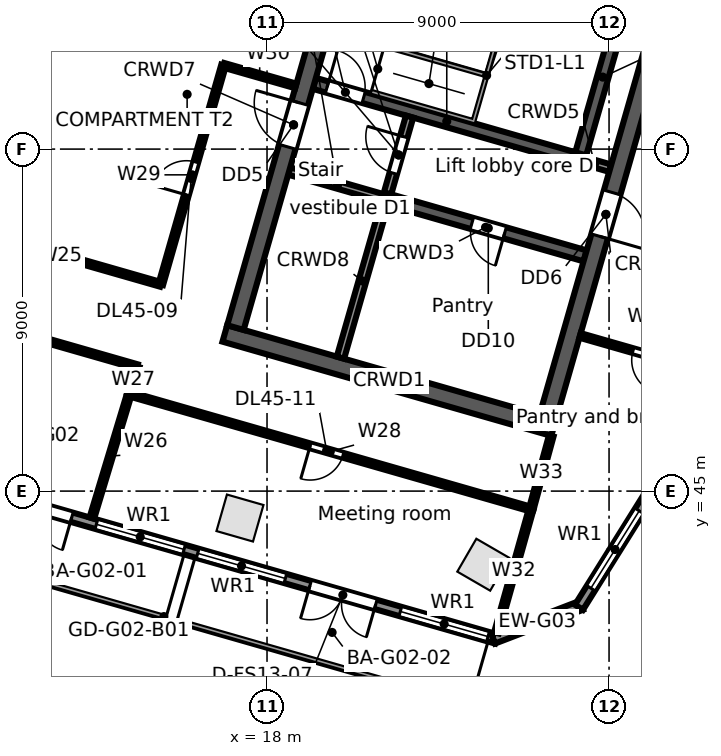
"""IFC4 building model, lengths in metres.
Left out: names, types, materials, properties, quantities, classifications, styles, units other than length and angle.
Written with IfcOpenShell. Run it as: python <this file> out.ifc"""

import sys

from ifc_helpers import new_model, si_unit, direction, frame, frame_2d, origin, origin_2d, place, context, subcontext, project, spatial, rectangle, extrude, element, fill, save


model = new_model("IFC4")
c1 = context("Model", 3, precision=1e-05, world=origin(), true_north=direction((0.0, 1.0)))
c2 = subcontext(c1, "Body", "Model", "MODEL_VIEW")
j1 = project(units=[si_unit("LENGTHUNIT", "METRE"), si_unit("PLANEANGLEUNIT", "RADIAN")], contexts=[c1])
p1 = place(None, origin())
s1 = spatial("IfcSite", under=j1, at=p1, CompositionType="ELEMENT")
p2 = place(p1, origin())
s2 = spatial("IfcBuilding", under=s1, at=p2, CompositionType="ELEMENT")
p3 = place(p2, frame((0.0, 0.0, 211.4)))
s3 = spatial("IfcBuildingStorey", under=s2, at=p3, CompositionType="ELEMENT", Elevation=211.4)
for number, where, z_axis, x_axis in (
    (1, (17.288, 44.291, 0.0), (0.0, 0.0, 1.0), (0.961, -0.276, 0.0)),
    (2, (23.69, 43.063, 0.0), (0.0, 0.0, 1.0), (-0.865, 0.501, 0.0)),
):
    element("IfcColumn", number, at=place(p3, frame(where, z_axis=z_axis, x_axis=x_axis)), inside=s3, PredefinedType="COLUMN", context=c2, shape_type="SweptSolid", body=[
        extrude(rectangle(XDim=1.0, YDim=1.0, at=origin_2d()), origin(), (0.0, 0.0, 1.0), 3.9),
    ])
p4 = place(p3, frame((24.034, 41.108, 0.0), z_axis=(0.0, 0.0, 1.0), x_axis=(-0.96126060691, 0.275641153683, 0.0)))
e3 = element("IfcWall", 3, at=p4, inside=s3, PredefinedType="STANDARD", context=c2, shape_type="SweptSolid", body=[
    extrude(rectangle(XDim=24.951, YDim=0.25, at=frame_2d((12.475, 0.0))), origin(), (0.0, 0.0, 1.0), 3.62),
])
p5 = place(p4, frame((22.416, 0.0, 0.8)))
e4 = element("IfcOpeningElement", 4, at=p5, cuts=e3, PredefinedType="OPENING", context=c2, shape_type="SweptSolid", body=[
    extrude(rectangle(XDim=2.4, YDim=2.2, at=frame_2d((1.2, 1.1))), frame((0.0, 0.135, 0.0), z_axis=(0.0, -1.0, 0.0), x_axis=(1.0, 0.0, 0.0)), (0.0, 0.0, 1.0), 0.27),
])
p6 = place(p4, frame((19.643, 0.0, 0.8)))
e5 = element("IfcOpeningElement", 5, at=p6, cuts=e3, PredefinedType="OPENING", context=c2, shape_type="SweptSolid", body=[
    extrude(rectangle(XDim=2.4, YDim=2.2, at=frame_2d((1.2, 1.1))), frame((0.0, 0.135, 0.0), z_axis=(0.0, -1.0, 0.0), x_axis=(1.0, 0.0, 0.0)), (0.0, 0.0, 1.0), 0.27),
])
p7 = place(p4, frame((16.869, 0.0, 0.8)))
e6 = element("IfcOpeningElement", 6, at=p7, cuts=e3, PredefinedType="OPENING", context=c2, shape_type="SweptSolid", body=[
    extrude(rectangle(XDim=2.4, YDim=2.2, at=frame_2d((1.2, 1.1))), frame((0.0, 0.135, 0.0), z_axis=(0.0, -1.0, 0.0), x_axis=(1.0, 0.0, 0.0)), (0.0, 0.0, 1.0), 0.27),
])
p8 = place(p4, frame((14.096, 0.0, 0.8)))
e7 = element("IfcOpeningElement", 7, at=p8, cuts=e3, PredefinedType="OPENING", context=c2, shape_type="SweptSolid", body=[
    extrude(rectangle(XDim=2.4, YDim=2.2, at=frame_2d((1.2, 1.1))), frame((0.0, 0.135, 0.0), z_axis=(0.0, -1.0, 0.0), x_axis=(1.0, 0.0, 0.0)), (0.0, 0.0, 1.0), 0.27),
])
p9 = place(p4, frame((11.622, 0.0, 0.0)))
e8 = element("IfcOpeningElement", 8, at=p9, cuts=e3, PredefinedType="OPENING", context=c2, shape_type="SweptSolid", body=[
    extrude(rectangle(XDim=1.8, YDim=2.4, at=frame_2d((0.9, 1.2))), frame((0.0, 0.135, 0.0), z_axis=(0.0, -1.0, 0.0), x_axis=(1.0, 0.0, 0.0)), (0.0, 0.0, 1.0), 0.27),
])
p10 = place(p4, frame((8.549, 0.0, 0.8)))
e9 = element("IfcOpeningElement", 9, at=p10, cuts=e3, PredefinedType="OPENING", context=c2, shape_type="SweptSolid", body=[
    extrude(rectangle(XDim=2.4, YDim=2.2, at=frame_2d((1.2, 1.1))), frame((0.0, 0.135, 0.0), z_axis=(0.0, -1.0, 0.0), x_axis=(1.0, 0.0, 0.0)), (0.0, 0.0, 1.0), 0.27),
])
p11 = place(p4, frame((5.775, 0.0, 0.8)))
e10 = element("IfcOpeningElement", 10, at=p11, cuts=e3, PredefinedType="OPENING", context=c2, shape_type="SweptSolid", body=[
    extrude(rectangle(XDim=2.4, YDim=2.2, at=frame_2d((1.2, 1.1))), frame((0.0, 0.135, 0.0), z_axis=(0.0, -1.0, 0.0), x_axis=(1.0, 0.0, 0.0)), (0.0, 0.0, 1.0), 0.27),
])
p12 = place(p4, frame((3.302, 0.0, 0.0)))
e11 = element("IfcOpeningElement", 11, at=p12, cuts=e3, PredefinedType="OPENING", context=c2, shape_type="SweptSolid", body=[
    extrude(rectangle(XDim=1.8, YDim=2.4, at=frame_2d((0.9, 1.2))), frame((0.0, 0.135, 0.0), z_axis=(0.0, -1.0, 0.0), x_axis=(1.0, 0.0, 0.0)), (0.0, 0.0, 1.0), 0.27),
])
p13 = place(p4, frame((0.229, 0.0, 0.8)))
e12 = element("IfcOpeningElement", 12, at=p13, cuts=e3, PredefinedType="OPENING", context=c2, shape_type="SweptSolid", body=[
    extrude(rectangle(XDim=2.4, YDim=2.2, at=frame_2d((1.2, 1.1))), frame((0.0, 0.135, 0.0), z_axis=(0.0, -1.0, 0.0), x_axis=(1.0, 0.0, 0.0)), (0.0, 0.0, 1.0), 0.27),
])
p14 = place(p3, frame((26.27, 41.993, 0.0), z_axis=(0.0, 0.0, 1.0), x_axis=(-0.933573798066, -0.358385216722, 0.0)))
e13 = element("IfcWall", 13, at=p14, inside=s3, PredefinedType="STANDARD", context=c2, shape_type="SweptSolid", body=[
    extrude(rectangle(XDim=2.48, YDim=0.25, at=frame_2d((1.24, 0.0))), origin(), (0.0, 0.0, 1.0), 3.62),
])
p15 = place(p3, frame((37.392, 59.84, 0.0), z_axis=(0.0, 0.0, 1.0), x_axis=(-0.529919909431, -0.848047692992, 0.0)))
e14 = element("IfcWall", 14, at=p15, inside=s3, PredefinedType="STANDARD", context=c2, shape_type="SweptSolid", body=[
    extrude(rectangle(XDim=21.104, YDim=0.25, at=frame_2d((10.552, 0.0))), origin(), (0.0, 0.0, 1.0), 3.62),
])
p16 = place(p15, frame((18.112, 0.0, 0.8)))
e15 = element("IfcOpeningElement", 15, at=p16, cuts=e14, PredefinedType="OPENING", context=c2, shape_type="SweptSolid", body=[
    extrude(rectangle(XDim=2.4, YDim=2.2, at=frame_2d((1.2, 1.1))), frame((0.0, 0.135, 0.0), z_axis=(0.0, -1.0, 0.0), x_axis=(1.0, 0.0, 0.0)), (0.0, 0.0, 1.0), 0.27),
])
p17 = place(p15, frame((14.612, 0.0, 0.8)))
e16 = element("IfcOpeningElement", 16, at=p17, cuts=e14, PredefinedType="OPENING", context=c2, shape_type="SweptSolid", body=[
    extrude(rectangle(XDim=2.4, YDim=2.2, at=frame_2d((1.2, 1.1))), frame((0.0, 0.135, 0.0), z_axis=(0.0, -1.0, 0.0), x_axis=(1.0, 0.0, 0.0)), (0.0, 0.0, 1.0), 0.27),
])
p18 = place(p15, frame((11.112, 0.0, 0.8)))
e17 = element("IfcOpeningElement", 17, at=p18, cuts=e14, PredefinedType="OPENING", context=c2, shape_type="SweptSolid", body=[
    extrude(rectangle(XDim=2.4, YDim=2.2, at=frame_2d((1.2, 1.1))), frame((0.0, 0.135, 0.0), z_axis=(0.0, -1.0, 0.0), x_axis=(1.0, 0.0, 0.0)), (0.0, 0.0, 1.0), 0.27),
])
p19 = place(p15, frame((7.612, 0.0, 0.8)))
e18 = element("IfcOpeningElement", 18, at=p19, cuts=e14, PredefinedType="OPENING", context=c2, shape_type="SweptSolid", body=[
    extrude(rectangle(XDim=2.4, YDim=2.2, at=frame_2d((1.2, 1.1))), frame((0.0, 0.135, 0.0), z_axis=(0.0, -1.0, 0.0), x_axis=(1.0, 0.0, 0.0)), (0.0, 0.0, 1.0), 0.27),
])
p20 = place(p15, frame((4.112, 0.0, 0.8)))
e19 = element("IfcOpeningElement", 19, at=p20, cuts=e14, PredefinedType="OPENING", context=c2, shape_type="SweptSolid", body=[
    extrude(rectangle(XDim=2.4, YDim=2.2, at=frame_2d((1.2, 1.1))), frame((0.0, 0.135, 0.0), z_axis=(0.0, -1.0, 0.0), x_axis=(1.0, 0.0, 0.0)), (0.0, 0.0, 1.0), 0.27),
])
p21 = place(p15, frame((0.612, 0.0, 0.8)))
e20 = element("IfcOpeningElement", 20, at=p21, cuts=e14, PredefinedType="OPENING", context=c2, shape_type="SweptSolid", body=[
    extrude(rectangle(XDim=2.4, YDim=2.2, at=frame_2d((1.2, 1.1))), frame((0.0, 0.135, 0.0), z_axis=(0.0, -1.0, 0.0), x_axis=(1.0, 0.0, 0.0)), (0.0, 0.0, 1.0), 0.27),
])
p22 = place(p3, frame((16.89, 49.149, 0.0), z_axis=(0.0, 0.0, 1.0), x_axis=(0.96126248289, -0.275634611374, 0.0)))
e21 = element("IfcWall", 21, at=p22, inside=s3, PredefinedType="SOLIDWALL", context=c2, shape_type="SweptSolid", body=[
    extrude(rectangle(XDim=9.0, YDim=0.45, at=frame_2d((4.5, 0.0))), origin(), (0.0, 0.0, 1.0), 3.62),
])
p23 = place(p3, frame((18.583, 53.423, 0.0), z_axis=(0.0, 0.0, 1.0), x_axis=(0.961259287968, -0.275645753268, 0.0)))
e22 = element("IfcWall", 22, at=p23, inside=s3, PredefinedType="SOLIDWALL", context=c2, shape_type="SweptSolid", body=[
    extrude(rectangle(XDim=2.65, YDim=0.2, at=frame_2d((1.325, 0.0))), origin(), (0.0, 0.0, 1.0), 3.62),
])
p24 = place(p3, frame((21.131, 52.692, 0.0), z_axis=(0.0, 0.0, 1.0), x_axis=(0.961261488075, -0.275638080722, 0.0)))
e23 = element("IfcWall", 23, at=p24, inside=s3, PredefinedType="SOLIDWALL", context=c2, shape_type="SweptSolid", body=[
    extrude(rectangle(XDim=5.45, YDim=0.3, at=frame_2d((2.725, 0.0))), origin(), (0.0, 0.0, 1.0), 3.62),
])
p25 = place(p24, frame((2.35, 0.0, 0.0)))
e24 = element("IfcOpeningElement", 24, at=p25, cuts=e23, PredefinedType="OPENING", context=c2, shape_type="SweptSolid", body=[
    extrude(rectangle(XDim=0.9, YDim=2.1, at=frame_2d((0.45, 1.05))), frame((0.0, 0.16, 0.0), z_axis=(0.0, -1.0, 0.0), x_axis=(1.0, 0.0, 0.0)), (0.0, 0.0, 1.0), 0.32),
])
p26 = place(p3, frame((19.245, 55.73, 0.0), z_axis=(0.0, 0.0, 1.0), x_axis=(0.961263007877, -0.275632780503, 0.0)))
e25 = element("IfcWall", 25, at=p26, inside=s3, PredefinedType="SOLIDWALL", context=c2, shape_type="SweptSolid", body=[
    extrude(rectangle(XDim=7.25, YDim=0.3, at=frame_2d((3.625, 0.0))), origin(), (0.0, 0.0, 1.0), 3.62),
])
p27 = place(p26, frame((0.35, 0.0, 0.0)))
e26 = element("IfcOpeningElement", 26, at=p27, cuts=e25, PredefinedType="OPENING", context=c2, shape_type="SweptSolid", body=[
    extrude(rectangle(XDim=1.0, YDim=2.1, at=frame_2d((0.5, 1.05))), frame((0.0, 0.16, 0.0), z_axis=(0.0, -1.0, 0.0), x_axis=(1.0, 0.0, 0.0)), (0.0, 0.0, 1.0), 0.32),
])
p28 = place(p3, frame((26.214, 53.732, 0.0), z_axis=(0.0, 0.0, 1.0), x_axis=(0.961241665642, -0.275707200184, 0.0)))
e27 = element("IfcWall", 27, at=p28, inside=s3, PredefinedType="SOLIDWALL", context=c2, shape_type="SweptSolid", body=[
    extrude(rectangle(XDim=0.85, YDim=0.2, at=frame_2d((0.425, 0.0))), origin(), (0.0, 0.0, 1.0), 3.62),
])
p29 = place(p3, frame((17.168, 49.303, 0.0), z_axis=(0.0, 0.0, 1.0), x_axis=(0.275638974822, 0.961261231695, 0.0)))
e28 = element("IfcWall", 28, at=p29, inside=s3, PredefinedType="SOLIDWALL", context=c2, shape_type="SweptSolid", body=[
    extrude(rectangle(XDim=11.1, YDim=0.45, at=frame_2d((5.55, 0.0))), origin(), (0.0, 0.0, 1.0), 3.62),
])
p30 = place(p29, frame((4.95, 0.0, 0.0)))
e29 = element("IfcOpeningElement", 29, at=p30, cuts=e28, PredefinedType="OPENING", context=c2, shape_type="SweptSolid", body=[
    extrude(rectangle(XDim=1.2, YDim=2.1, at=frame_2d((0.6, 1.05))), frame((0.0, 0.235, 0.0), z_axis=(0.0, -1.0, 0.0), x_axis=(1.0, 0.0, 0.0)), (0.0, 0.0, 1.0), 0.47),
])
p31 = place(p3, frame((19.932, 48.511, 0.0), z_axis=(0.0, 0.0, 1.0), x_axis=(0.275642273411, 0.961260285827, 0.0)))
e30 = element("IfcWall", 30, at=p31, inside=s3, PredefinedType="SOLIDWALL", context=c2, shape_type="SweptSolid", body=[
    extrude(rectangle(XDim=4.2, YDim=0.2, at=frame_2d((2.1, 0.0))), origin(), (0.0, 0.0, 1.0), 3.62),
])
p32 = place(p3, frame((21.172, 52.837, 0.0), z_axis=(0.0, 0.0, 1.0), x_axis=(0.275657676022, 0.961255868981, 0.0)))
e31 = element("IfcWall", 31, at=p32, inside=s3, PredefinedType="PARTITIONING", context=c2, shape_type="SweptSolid", body=[
    extrude(rectangle(XDim=2.1, YDim=0.2, at=frame_2d((1.05, 0.0))), origin(), (0.0, 0.0, 1.0), 3.62),
])
p33 = place(p32, frame((0.55, 0.0, 0.0)))
e32 = element("IfcOpeningElement", 32, at=p33, cuts=e31, PredefinedType="OPENING", context=c2, shape_type="SweptSolid", body=[
    extrude(rectangle(XDim=1.0, YDim=2.1, at=frame_2d((0.5, 1.05))), frame((0.0, 0.11, 0.0), z_axis=(0.0, -1.0, 0.0), x_axis=(1.0, 0.0, 0.0)), (0.0, 0.0, 1.0), 0.22),
])
p34 = place(p3, frame((26.256, 53.876, 0.0), z_axis=(0.0, 0.0, 1.0), x_axis=(0.275588560745, 0.96127568636, 0.0)))
e33 = element("IfcWall", 33, at=p34, inside=s3, PredefinedType="SOLIDWALL", context=c2, shape_type="SweptSolid", body=[
    extrude(rectangle(XDim=4.2, YDim=0.3, at=frame_2d((2.1, 0.0))), origin(), (0.0, 0.0, 1.0), 3.62),
])
p35 = place(p3, frame((25.387, 46.947, 0.0), z_axis=(0.0, 0.0, 1.0), x_axis=(0.275638974822, 0.961261231695, 0.0)))
e34 = element("IfcWall", 34, at=p35, inside=s3, PredefinedType="SOLIDWALL", context=c2, shape_type="SweptSolid", body=[
    extrude(rectangle(XDim=11.1, YDim=0.45, at=frame_2d((5.55, 0.0))), origin(), (0.0, 0.0, 1.0), 3.62),
])
p36 = place(p35, frame((4.95, 0.0, 0.0)))
e35 = element("IfcOpeningElement", 35, at=p36, cuts=e34, PredefinedType="OPENING", context=c2, shape_type="SweptSolid", body=[
    extrude(rectangle(XDim=1.2, YDim=2.1, at=frame_2d((0.6, 1.05))), frame((0.0, 0.235, 0.0), z_axis=(0.0, -1.0, 0.0), x_axis=(1.0, 0.0, 0.0)), (0.0, 0.0, 1.0), 0.47),
])
p37 = place(p3, frame((6.413, 50.619, 0.0), z_axis=(0.0, 0.0, 1.0), x_axis=(0.961251402136, -0.275673252041, 0.0)))
e36 = element("IfcWall", 36, at=p37, inside=s3, PredefinedType="PARTITIONING", context=c2, shape_type="SweptSolid", body=[
    extrude(rectangle(XDim=8.499, YDim=0.125, at=frame_2d((4.25, 0.0))), origin(), (0.0, 0.0, 1.0), 2.8),
])
p38 = place(p37, frame((3.7, 0.0, 0.0)))
e37 = element("IfcOpeningElement", 37, at=p38, cuts=e36, PredefinedType="OPENING", context=c2, shape_type="SweptSolid", body=[
    extrude(rectangle(XDim=0.9, YDim=2.1, at=frame_2d((0.45, 1.05))), frame((0.0, 0.073, 0.0), z_axis=(0.0, -1.0, 0.0), x_axis=(1.0, 0.0, 0.0)), (0.0, 0.0, 1.0), 0.145),
])
p39 = place(p3, frame((9.917, 51.955, 0.0), z_axis=(0.0, 0.0, 1.0), x_axis=(0.275933286704, 0.96117678982, 0.0)))
e38 = element("IfcWall", 38, at=p39, inside=s3, PredefinedType="PARTITIONING", context=c2, shape_type="SweptSolid", body=[
    extrude(rectangle(XDim=16.41, YDim=0.125, at=frame_2d((8.205, 0.0))), origin(), (0.0, 0.0, 1.0), 2.792),
])
p40 = place(p3, frame((9.917, 51.955, 0.0), z_axis=(0.0, 0.0, 1.0), x_axis=(0.961258850611, -0.275647278458, 0.0)))
e39 = element("IfcWall", 39, at=p40, inside=s3, PredefinedType="PARTITIONING", context=c2, shape_type="SweptSolid", body=[
    extrude(rectangle(XDim=5.5, YDim=0.125, at=frame_2d((2.75, 0.0))), origin(), (0.0, 0.0, 1.0), 2.8),
])
p41 = place(p3, frame((13.39, 44.29, 0.0), z_axis=(0.0, 0.0, 1.0), x_axis=(0.289389501276, 0.957211427299, 0.0)))
e40 = element("IfcWall", 40, at=p41, inside=s3, PredefinedType="PARTITIONING", context=c2, shape_type="SweptSolid", body=[
    extrude(rectangle(XDim=3.411, YDim=0.125, at=frame_2d((1.706, 0.0))), origin(), (0.0, 0.0, 1.0), 2.994),
])
p42 = place(p3, frame((14.377, 47.555, 0.0), z_axis=(0.0, 0.0, 1.0), x_axis=(0.274807134575, 0.961499370144, 0.0)))
e41 = element("IfcWall", 41, at=p42, inside=s3, PredefinedType="PARTITIONING", context=c2, shape_type="SweptSolid", body=[
    extrude(rectangle(XDim=0.75, YDim=0.125, at=frame_2d((0.375, 0.0))), origin(), (0.0, 0.0, 1.0), 3.62),
])
p43 = place(p3, frame((14.377, 47.555, 0.0), z_axis=(0.0, 0.0, 1.0), x_axis=(0.961263044958, -0.275632651182, 0.0)))
e42 = element("IfcWall", 42, at=p43, inside=s3, PredefinedType="PARTITIONING", context=c2, shape_type="SweptSolid", body=[
    extrude(rectangle(XDim=11.0, YDim=0.125, at=frame_2d((5.5, 0.0))), origin(), (0.0, 0.0, 1.0), 2.9),
])
p44 = place(p43, frame((4.95, 0.0, 0.0)))
e43 = element("IfcOpeningElement", 43, at=p44, cuts=e42, PredefinedType="OPENING", context=c2, shape_type="SweptSolid", body=[
    extrude(rectangle(XDim=0.9, YDim=2.1, at=frame_2d((0.45, 1.05))), frame((0.0, 0.073, 0.0), z_axis=(0.0, -1.0, 0.0), x_axis=(1.0, 0.0, 0.0)), (0.0, 0.0, 1.0), 0.145),
])
p45 = place(p3, frame((15.204, 50.439, 0.0), z_axis=(0.0, 0.0, 1.0), x_axis=(0.275505760599, 0.961299420512, 0.0)))
e44 = element("IfcWall", 44, at=p45, inside=s3, PredefinedType="PARTITIONING", context=c2, shape_type="SweptSolid", body=[
    extrude(rectangle(XDim=5.999, YDim=0.125, at=frame_2d((3.0, 0.0))), origin(), (0.0, 0.0, 1.0), 2.8),
])
p46 = place(p45, frame((2.45, 0.0, 0.0)))
e45 = element("IfcOpeningElement", 45, at=p46, cuts=e44, PredefinedType="OPENING", context=c2, shape_type="SweptSolid", body=[
    extrude(rectangle(XDim=0.9, YDim=2.1, at=frame_2d((0.45, 1.05))), frame((0.0, 0.073, 0.0), z_axis=(0.0, -1.0, 0.0), x_axis=(1.0, 0.0, 0.0)), (0.0, 0.0, 1.0), 0.145),
])
p47 = place(p3, frame((16.857, 56.206, 0.0), z_axis=(0.0, 0.0, 1.0), x_axis=(0.961383985066, -0.275210525341, 0.0)))
e46 = element("IfcWall", 46, at=p47, inside=s3, PredefinedType="PARTITIONING", context=c2, shape_type="SweptSolid", body=[
    extrude(rectangle(XDim=1.977, YDim=0.125, at=frame_2d((0.988, 0.0))), origin(), (0.0, 0.0, 1.0), 3.62),
])
p48 = place(p3, frame((24.036, 41.27, 0.0), z_axis=(0.0, 0.0, 1.0), x_axis=(0.270787421954, 0.962639170256, 0.0)))
e47 = element("IfcWall", 47, at=p48, inside=s3, PredefinedType="PARTITIONING", context=c2, shape_type="SweptSolid", body=[
    extrude(rectangle(XDim=3.379, YDim=0.125, at=frame_2d((1.689, 0.0))), origin(), (0.0, 0.0, 1.0), 2.9),
])
p49 = place(p3, frame((24.951, 44.523, 0.0), z_axis=(0.0, 0.0, 1.0), x_axis=(0.264046927145, 0.964509834198, 0.0)))
e48 = element("IfcWall", 48, at=p49, inside=s3, PredefinedType="PARTITIONING", context=c2, shape_type="SweptSolid", body=[
    extrude(rectangle(XDim=2.0, YDim=0.125, at=frame_2d((1.0, 0.0))), origin(), (0.0, 0.0, 1.0), 2.9),
])
p50 = place(p3, frame((26.237, 49.096, 0.0), z_axis=(0.0, 0.0, 1.0), x_axis=(0.961285271066, -0.275555126304, 0.0)))
e49 = element("IfcWall", 49, at=p50, inside=s3, PredefinedType="PARTITIONING", context=c2, shape_type="SweptSolid", body=[
    extrude(rectangle(XDim=3.789, YDim=0.125, at=frame_2d((1.894, 0.0))), origin(), (0.0, 0.0, 1.0), 2.9),
])
p51 = place(p50, frame((1.45, 0.0, 0.0)))
e50 = element("IfcOpeningElement", 50, at=p51, cuts=e49, PredefinedType="OPENING", context=c2, shape_type="SweptSolid", body=[
    extrude(rectangle(XDim=0.9, YDim=2.1, at=frame_2d((0.45, 1.05))), frame((0.0, 0.073, 0.0), z_axis=(0.0, -1.0, 0.0), x_axis=(1.0, 0.0, 0.0)), (0.0, 0.0, 1.0), 0.145),
])
p52 = place(p9, origin())
e51 = element("IfcDoor", 51, at=p52, inside=s3, OperationType="DOUBLE_DOOR_SINGLE_SWING", PredefinedType="DOOR", context=c2, shape_type="SweptSolid", body=[
    extrude(rectangle(XDim=1.8, YDim=2.4, at=frame_2d((0.9, 1.2))), frame((0.0, 0.025, 0.0), z_axis=(0.0, -1.0, 0.0), x_axis=(1.0, 0.0, 0.0)), (0.0, 0.0, 1.0), 0.05),
])
fill(e8, e51)
p53 = place(p10, origin())
e52 = element("IfcWindow", 52, at=p53, inside=s3, PartitioningType="SINGLE_PANEL", PredefinedType="WINDOW", context=c2, shape_type="SweptSolid", body=[
    extrude(rectangle(XDim=2.4, YDim=2.2, at=frame_2d((1.2, 1.1))), frame((0.0, 0.03, 0.0), z_axis=(0.0, -1.0, 0.0), x_axis=(1.0, 0.0, 0.0)), (0.0, 0.0, 1.0), 0.06),
])
fill(e9, e52)
p54 = place(p11, origin())
e53 = element("IfcWindow", 53, at=p54, inside=s3, PartitioningType="SINGLE_PANEL", PredefinedType="WINDOW", context=c2, shape_type="SweptSolid", body=[
    extrude(rectangle(XDim=2.4, YDim=2.2, at=frame_2d((1.2, 1.1))), frame((0.0, 0.03, 0.0), z_axis=(0.0, -1.0, 0.0), x_axis=(1.0, 0.0, 0.0)), (0.0, 0.0, 1.0), 0.06),
])
fill(e10, e53)
p55 = place(p12, origin())
e54 = element("IfcDoor", 54, at=p55, inside=s3, OperationType="DOUBLE_DOOR_SINGLE_SWING", PredefinedType="DOOR", context=c2, shape_type="SweptSolid", body=[
    extrude(rectangle(XDim=1.8, YDim=2.4, at=frame_2d((0.9, 1.2))), frame((0.0, 0.025, 0.0), z_axis=(0.0, -1.0, 0.0), x_axis=(1.0, 0.0, 0.0)), (0.0, 0.0, 1.0), 0.05),
])
fill(e11, e54)
p56 = place(p13, origin())
e55 = element("IfcWindow", 55, at=p56, inside=s3, PartitioningType="SINGLE_PANEL", PredefinedType="WINDOW", context=c2, shape_type="SweptSolid", body=[
    extrude(rectangle(XDim=2.4, YDim=2.2, at=frame_2d((1.2, 1.1))), frame((0.0, 0.03, 0.0), z_axis=(0.0, -1.0, 0.0), x_axis=(1.0, 0.0, 0.0)), (0.0, 0.0, 1.0), 0.06),
])
fill(e12, e55)
p57 = place(p16, origin())
e56 = element("IfcWindow", 56, at=p57, inside=s3, PartitioningType="SINGLE_PANEL", PredefinedType="WINDOW", context=c2, shape_type="SweptSolid", body=[
    extrude(rectangle(XDim=2.4, YDim=2.2, at=frame_2d((1.2, 1.1))), frame((0.0, 0.03, 0.0), z_axis=(0.0, -1.0, 0.0), x_axis=(1.0, 0.0, 0.0)), (0.0, 0.0, 1.0), 0.06),
])
fill(e15, e56)
p58 = place(p27, origin())
e57 = element("IfcDoor", 57, at=p58, inside=s3, OperationType="SINGLE_SWING_LEFT", PredefinedType="DOOR", context=c2, shape_type="SweptSolid", body=[
    extrude(rectangle(XDim=1.0, YDim=2.1, at=frame_2d((0.5, 1.05))), frame((0.0, 0.025, 0.0), z_axis=(0.0, -1.0, 0.0), x_axis=(1.0, 0.0, 0.0)), (0.0, 0.0, 1.0), 0.05),
])
fill(e26, e57)
p59 = place(p33, origin())
e58 = element("IfcDoor", 58, at=p59, inside=s3, OperationType="SINGLE_SWING_RIGHT", PredefinedType="DOOR", context=c2, shape_type="SweptSolid", body=[
    extrude(rectangle(XDim=1.0, YDim=2.1, at=frame_2d((0.5, 1.05))), frame((0.0, 0.025, 0.0), z_axis=(0.0, -1.0, 0.0), x_axis=(1.0, 0.0, 0.0)), (0.0, 0.0, 1.0), 0.05),
])
fill(e32, e58)
p60 = place(p30, origin())
e59 = element("IfcDoor", 59, at=p60, inside=s3, OperationType="SINGLE_SWING_RIGHT", PredefinedType="DOOR", context=c2, shape_type="SweptSolid", body=[
    extrude(rectangle(XDim=1.2, YDim=2.1, at=frame_2d((0.6, 1.05))), frame((0.0, 0.025, 0.0), z_axis=(0.0, -1.0, 0.0), x_axis=(1.0, 0.0, 0.0)), (0.0, 0.0, 1.0), 0.05),
])
fill(e29, e59)
p61 = place(p36, frame((1.2, 0.0, 0.0), z_axis=(0.0, 0.0, 1.0), x_axis=(-1.0, 0.0, 0.0)))
e60 = element("IfcDoor", 60, at=p61, inside=s3, OperationType="SINGLE_SWING_RIGHT", PredefinedType="DOOR", context=c2, shape_type="SweptSolid", body=[
    extrude(rectangle(XDim=1.2, YDim=2.1, at=frame_2d((0.6, 1.05))), frame((0.0, 0.025, 0.0), z_axis=(0.0, -1.0, 0.0), x_axis=(1.0, 0.0, 0.0)), (0.0, 0.0, 1.0), 0.05),
])
fill(e35, e60)
p62 = place(p25, frame((0.9, 0.0, 0.0), z_axis=(0.0, 0.0, 1.0), x_axis=(-1.0, 0.0, 0.0)))
e61 = element("IfcDoor", 61, at=p62, inside=s3, OperationType="SINGLE_SWING_LEFT", PredefinedType="DOOR", context=c2, shape_type="SweptSolid", body=[
    extrude(rectangle(XDim=0.9, YDim=2.1, at=frame_2d((0.45, 1.05))), frame((0.0, 0.025, 0.0), z_axis=(0.0, -1.0, 0.0), x_axis=(1.0, 0.0, 0.0)), (0.0, 0.0, 1.0), 0.05),
])
fill(e24, e61)
p63 = place(p46, origin())
e62 = element("IfcDoor", 62, at=p63, inside=s3, OperationType="SINGLE_SWING_LEFT", PredefinedType="DOOR", context=c2, shape_type="SweptSolid", body=[
    extrude(rectangle(XDim=0.9, YDim=2.1, at=frame_2d((0.45, 1.05))), frame((0.0, 0.025, 0.0), z_axis=(0.0, -1.0, 0.0), x_axis=(1.0, 0.0, 0.0)), (0.0, 0.0, 1.0), 0.05),
])
fill(e45, e62)
p64 = place(p44, frame((0.9, 0.0, 0.0), z_axis=(0.0, 0.0, 1.0), x_axis=(-1.0, 0.0, 0.0)))
e63 = element("IfcDoor", 63, at=p64, inside=s3, OperationType="SINGLE_SWING_RIGHT", PredefinedType="DOOR", context=c2, shape_type="SweptSolid", body=[
    extrude(rectangle(XDim=0.9, YDim=2.1, at=frame_2d((0.45, 1.05))), frame((0.0, 0.025, 0.0), z_axis=(0.0, -1.0, 0.0), x_axis=(1.0, 0.0, 0.0)), (0.0, 0.0, 1.0), 0.05),
])
fill(e43, e63)
p65 = place(p51, frame((0.9, 0.0, 0.0), z_axis=(0.0, 0.0, 1.0), x_axis=(-1.0, 0.0, 0.0)))
e64 = element("IfcDoor", 64, at=p65, inside=s3, OperationType="SINGLE_SWING_LEFT", PredefinedType="DOOR", context=c2, shape_type="SweptSolid", body=[
    extrude(rectangle(XDim=0.9, YDim=2.1, at=frame_2d((0.45, 1.05))), frame((0.0, 0.025, 0.0), z_axis=(0.0, -1.0, 0.0), x_axis=(1.0, 0.0, 0.0)), (0.0, 0.0, 1.0), 0.05),
])
fill(e50, e64)
save(model, sys.argv[1])
